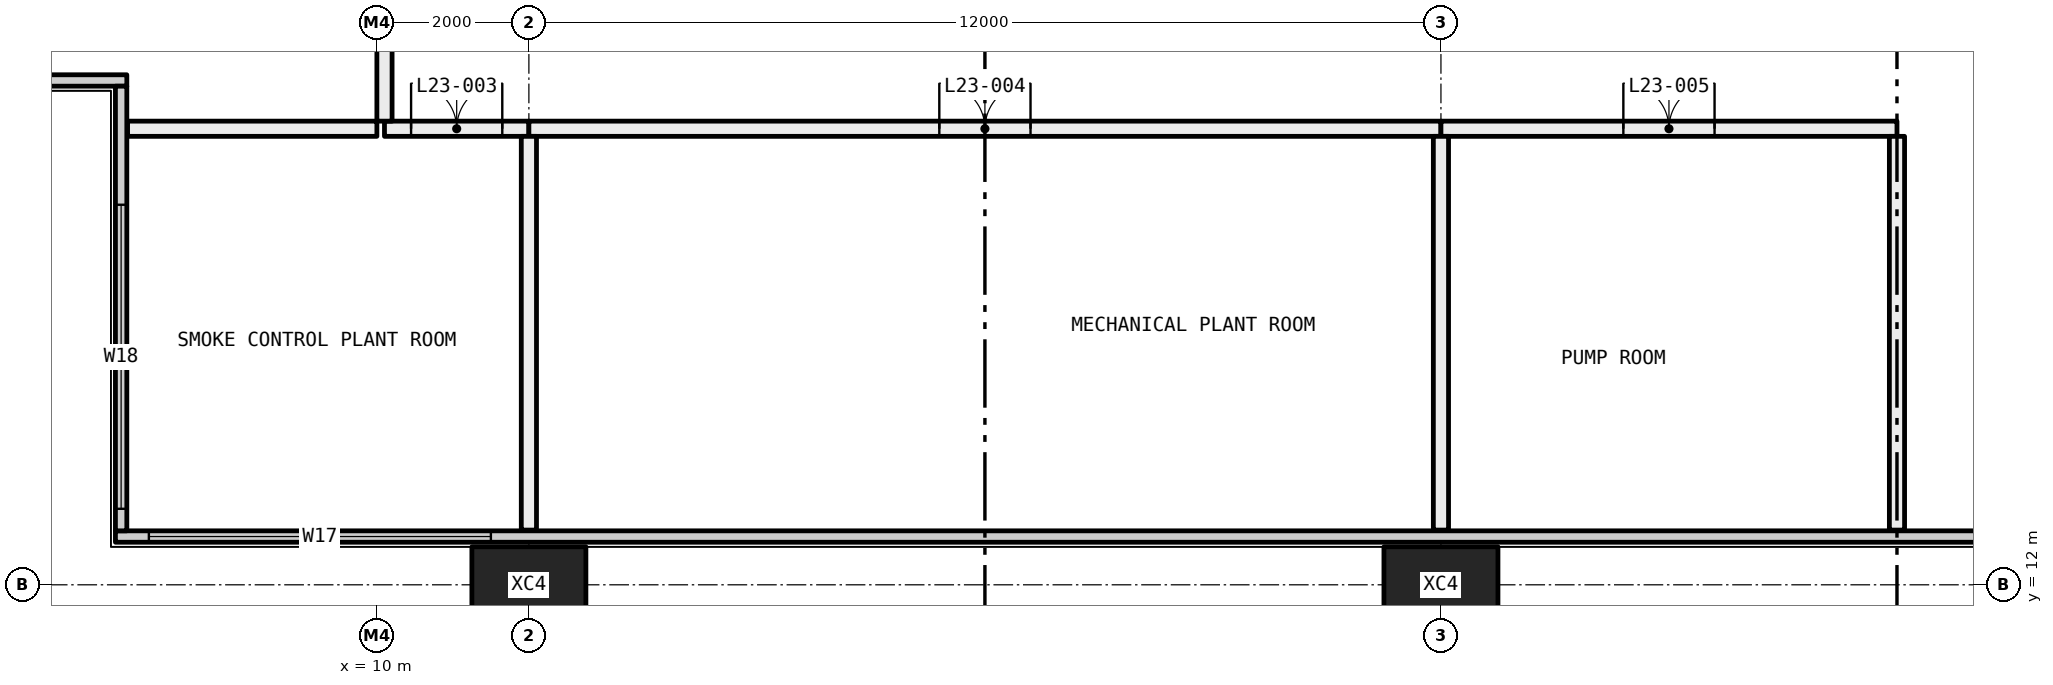
"""IFC4 building model, lengths in metres.
Left out: names, types, materials, properties, quantities, classifications, styles, units other than length and angle.
Written with IfcOpenShell. Run it as: python <this file> out.ifc"""

import sys

from ifc_helpers import new_model, si_unit, direction, frame, frame_2d, origin, origin_2d, place, context, subcontext, project, spatial, rectangle, hollow_rectangle, extrude, element, fill, save


model = new_model("IFC4")
c1 = context("Model", 3, precision=1e-05, world=origin(), true_north=direction((0.0, 1.0)))
c2 = subcontext(c1, "Body", "Model", "MODEL_VIEW")
j1 = project(units=[si_unit("LENGTHUNIT", "METRE"), si_unit("PLANEANGLEUNIT", "RADIAN")], contexts=[c1])
p1 = place(None, origin())
s1 = spatial("IfcSite", under=j1, at=p1, CompositionType="ELEMENT")
p2 = place(p1, origin())
s2 = spatial("IfcBuilding", under=s1, at=p2, CompositionType="ELEMENT")
p3 = place(p2, frame((0.0, 0.0, 92.1)))
s3 = spatial("IfcBuildingStorey", under=s2, at=p3, CompositionType="ELEMENT", Elevation=92.1)
for number, where, z_axis, x_axis in (
    (1, (12.0, 12.0, 0.0), (0.0, 0.0, 1.0), (1.0, 0.0, 0.0)),
    (2, (24.0, 12.0, 0.0), (0.0, 0.0, 1.0), (1.0, 0.0, 0.0)),
):
    element("IfcColumn", number, at=place(p3, frame(where, z_axis=z_axis, x_axis=x_axis)), inside=s3, PredefinedType="COLUMN", context=c2, shape_type="SweptSolid", body=[
        extrude(hollow_rectangle(XDim=1.5, YDim=1.0, WallThickness=0.06, at=origin_2d()), origin(), (0.0, 0.0, 1.0), 4.1),
    ])
p4 = place(p3, frame((6.56, 12.635, 0.0), z_axis=(0.0, 0.0, 1.0), x_axis=(1.0, 0.0, 0.0)))
e3 = element("IfcWall", 3, at=p4, inside=s3, PredefinedType="ELEMENTEDWALL", context=c2, shape_type="SweptSolid", body=[
    extrude(rectangle(XDim=58.88, YDim=0.15, at=frame_2d((29.44, 0.0))), origin(), (0.0, 0.0, 1.0), 4.1),
])
p5 = place(p4, frame((0.44, 0.0, 0.45)))
e4 = element("IfcOpeningElement", 4, at=p5, cuts=e3, PredefinedType="OPENING", context=c2, shape_type="SweptSolid", body=[
    extrude(rectangle(XDim=4.5, YDim=3.6, at=frame_2d((2.25, 1.8))), frame((0.0, 0.085, 0.0), z_axis=(0.0, -1.0, 0.0), x_axis=(1.0, 0.0, 0.0)), (0.0, 0.0, 1.0), 0.17),
])
p6 = place(p4, frame((27.54, 0.0, 0.45)))
e5 = element("IfcOpeningElement", 5, at=p6, cuts=e3, PredefinedType="OPENING", context=c2, shape_type="SweptSolid", body=[
    extrude(rectangle(XDim=1.4, YDim=3.6, at=frame_2d((0.7, 1.8))), frame((0.0, 0.085, 0.0), z_axis=(0.0, -1.0, 0.0), x_axis=(1.0, 0.0, 0.0)), (0.0, 0.0, 1.0), 0.17),
])
p7 = place(p4, frame((25.54, 0.0, 0.0)))
e6 = element("IfcOpeningElement", 6, at=p7, cuts=e3, PredefinedType="OPENING", context=c2, shape_type="SweptSolid", body=[
    extrude(rectangle(XDim=1.8, YDim=2.4, at=frame_2d((0.9, 1.2))), frame((0.0, 0.085, 0.0), z_axis=(0.0, -1.0, 0.0), x_axis=(1.0, 0.0, 0.0)), (0.0, 0.0, 1.0), 0.17),
])
p8 = place(p4, frame((53.94, 0.0, 0.45)))
e7 = element("IfcOpeningElement", 7, at=p8, cuts=e3, PredefinedType="OPENING", context=c2, shape_type="SweptSolid", body=[
    extrude(rectangle(XDim=4.5, YDim=3.6, at=frame_2d((2.25, 1.8))), frame((0.0, 0.085, 0.0), z_axis=(0.0, -1.0, 0.0), x_axis=(1.0, 0.0, 0.0)), (0.0, 0.0, 1.0), 0.17),
])
p9 = place(p3, frame((0.56, 18.635, 0.0), z_axis=(0.0, 0.0, 1.0), x_axis=(1.0, 0.0, 0.0)))
e8 = element("IfcWall", 8, at=p9, inside=s3, PredefinedType="ELEMENTEDWALL", context=c2, shape_type="SweptSolid", body=[
    extrude(rectangle(XDim=6.15, YDim=0.15, at=frame_2d((3.075, 0.0))), origin(), (0.0, 0.0, 1.0), 4.1),
])
p10 = place(p9, frame((0.44, 0.0, 0.45)))
e9 = element("IfcOpeningElement", 9, at=p10, cuts=e8, PredefinedType="OPENING", context=c2, shape_type="SweptSolid", body=[
    extrude(rectangle(XDim=4.0, YDim=3.6, at=frame_2d((2.0, 1.8))), frame((0.0, 0.085, 0.0), z_axis=(0.0, -1.0, 0.0), x_axis=(1.0, 0.0, 0.0)), (0.0, 0.0, 1.0), 0.17),
])
p11 = place(p3, frame((6.635, 12.71, 0.0), z_axis=(0.0, 0.0, 1.0), x_axis=(0.0, 1.0, 0.0)))
e10 = element("IfcWall", 10, at=p11, inside=s3, PredefinedType="ELEMENTEDWALL", context=c2, shape_type="SweptSolid", body=[
    extrude(rectangle(XDim=5.85, YDim=0.15, at=frame_2d((2.925, 0.0))), origin(), (0.0, 0.0, 1.0), 4.1),
])
p12 = place(p11, frame((0.29, 0.0, 0.45)))
e11 = element("IfcOpeningElement", 11, at=p12, cuts=e10, PredefinedType="OPENING", context=c2, shape_type="SweptSolid", body=[
    extrude(rectangle(XDim=4.0, YDim=3.6, at=frame_2d((2.0, 1.8))), frame((0.0, 0.085, 0.0), z_axis=(0.0, -1.0, 0.0), x_axis=(1.0, 0.0, 0.0)), (0.0, 0.0, 1.0), 0.17),
])
p13 = place(p3, frame((10.1, 18.0, 0.0), z_axis=(0.0, 0.0, 1.0), x_axis=(1.0, 0.0, 0.0)))
e12 = element("IfcWall", 12, at=p13, inside=s3, PredefinedType="PARTITIONING", context=c2, shape_type="SweptSolid", body=[
    extrude(rectangle(XDim=1.9, YDim=0.2, at=frame_2d((0.95, 0.0))), origin(), (0.0, 0.0, 1.0), 4.1),
])
p14 = place(p13, frame((0.35, 0.0, 0.0)))
e13 = element("IfcOpeningElement", 13, at=p14, cuts=e12, PredefinedType="OPENING", context=c2, shape_type="SweptSolid", body=[
    extrude(rectangle(XDim=1.2, YDim=2.1, at=frame_2d((0.6, 1.05))), frame((0.0, 0.11, 0.0), z_axis=(0.0, -1.0, 0.0), x_axis=(1.0, 0.0, 0.0)), (0.0, 0.0, 1.0), 0.22),
])
p15 = place(p3, frame((12.0, 18.0, 0.0), z_axis=(0.0, 0.0, 1.0), x_axis=(1.0, 0.0, 0.0)))
e14 = element("IfcWall", 14, at=p15, inside=s3, PredefinedType="PARTITIONING", context=c2, shape_type="SweptSolid", body=[
    extrude(rectangle(XDim=12.0, YDim=0.2, at=frame_2d((6.0, 0.0))), origin(), (0.0, 0.0, 1.0), 4.1),
])
p16 = place(p15, frame((5.4, 0.0, 0.0)))
e15 = element("IfcOpeningElement", 15, at=p16, cuts=e14, PredefinedType="OPENING", context=c2, shape_type="SweptSolid", body=[
    extrude(rectangle(XDim=1.2, YDim=2.1, at=frame_2d((0.6, 1.05))), frame((0.0, 0.11, 0.0), z_axis=(0.0, -1.0, 0.0), x_axis=(1.0, 0.0, 0.0)), (0.0, 0.0, 1.0), 0.22),
])
p17 = place(p3, frame((24.0, 18.0, 0.0), z_axis=(0.0, 0.0, 1.0), x_axis=(1.0, 0.0, 0.0)))
e16 = element("IfcWall", 16, at=p17, inside=s3, PredefinedType="PARTITIONING", context=c2, shape_type="SweptSolid", body=[
    extrude(rectangle(XDim=6.0, YDim=0.2, at=frame_2d((3.0, 0.0))), origin(), (0.0, 0.0, 1.0), 4.1),
])
p18 = place(p17, frame((2.4, 0.0, 0.0)))
e17 = element("IfcOpeningElement", 17, at=p18, cuts=e16, PredefinedType="OPENING", context=c2, shape_type="SweptSolid", body=[
    extrude(rectangle(XDim=1.2, YDim=2.1, at=frame_2d((0.6, 1.05))), frame((0.0, 0.11, 0.0), z_axis=(0.0, -1.0, 0.0), x_axis=(1.0, 0.0, 0.0)), (0.0, 0.0, 1.0), 0.22),
])
p19 = place(p3, frame((30.0, 17.9, 0.0), z_axis=(0.0, 0.0, 1.0), x_axis=(0.0, -1.0, 0.0)))
e18 = element("IfcWall", 18, at=p19, inside=s3, PredefinedType="PARTITIONING", context=c2, shape_type="SweptSolid", body=[
    extrude(rectangle(XDim=5.18, YDim=0.2, at=frame_2d((2.59, 0.0))), origin(), (0.0, 0.0, 1.0), 4.1),
])
p20 = place(p3, frame((10.1, 24.0, 0.0), z_axis=(0.0, 0.0, 1.0), x_axis=(0.0, -1.0, 0.0)))
e19 = element("IfcWall", 19, at=p20, inside=s3, PredefinedType="PARTITIONING", context=c2, shape_type="SweptSolid", body=[
    extrude(rectangle(XDim=5.9, YDim=0.2, at=frame_2d((2.95, 0.0))), origin(), (0.0, 0.0, 1.0), 3.5),
])
p21 = place(p20, frame((2.35, 0.0, 0.0)))
e20 = element("IfcOpeningElement", 20, at=p21, cuts=e19, PredefinedType="OPENING", context=c2, shape_type="SweptSolid", body=[
    extrude(rectangle(XDim=1.2, YDim=2.1, at=frame_2d((0.6, 1.05))), frame((0.0, 0.11, 0.0), z_axis=(0.0, -1.0, 0.0), x_axis=(1.0, 0.0, 0.0)), (0.0, 0.0, 1.0), 0.22),
])
p22 = place(p3, frame((12.0, 12.72, 0.0), z_axis=(0.0, 0.0, 1.0), x_axis=(0.0, 1.0, 0.0)))
e21 = element("IfcWall", 21, at=p22, inside=s3, PredefinedType="PARTITIONING", context=c2, shape_type="SweptSolid", body=[
    extrude(rectangle(XDim=5.18, YDim=0.2, at=frame_2d((2.59, 0.0))), origin(), (0.0, 0.0, 1.0), 4.1),
])
p23 = place(p3, frame((10.0, 18.0, 0.0), z_axis=(0.0, 0.0, 1.0), x_axis=(-1.0, 0.0, 0.0)))
e22 = element("IfcWall", 22, at=p23, inside=s3, PredefinedType="PARTITIONING", context=c2, shape_type="SweptSolid", body=[
    extrude(rectangle(XDim=3.28, YDim=0.2, at=frame_2d((1.64, 0.0))), origin(), (0.0, 0.0, 1.0), 4.1),
])
p24 = place(p3, frame((24.0, 12.72, 0.0), z_axis=(0.0, 0.0, 1.0), x_axis=(0.0, 1.0, 0.0)))
e23 = element("IfcWall", 23, at=p24, inside=s3, PredefinedType="PARTITIONING", context=c2, shape_type="SweptSolid", body=[
    extrude(rectangle(XDim=5.18, YDim=0.2, at=frame_2d((2.59, 0.0))), origin(), (0.0, 0.0, 1.0), 4.1),
])
p25 = place(p5, origin())
e24 = element("IfcWindow", 24, at=p25, inside=s3, PartitioningType="SINGLE_PANEL", PredefinedType="WINDOW", context=c2, shape_type="SweptSolid", body=[
    extrude(rectangle(XDim=4.5, YDim=3.6, at=frame_2d((2.25, 1.8))), frame((0.0, 0.03, 0.0), z_axis=(0.0, -1.0, 0.0), x_axis=(1.0, 0.0, 0.0)), (0.0, 0.0, 1.0), 0.06),
])
fill(e4, e24)
p26 = place(p12, origin())
e25 = element("IfcWindow", 25, at=p26, inside=s3, PartitioningType="SINGLE_PANEL", PredefinedType="WINDOW", context=c2, shape_type="SweptSolid", body=[
    extrude(rectangle(XDim=4.0, YDim=3.6, at=frame_2d((2.0, 1.8))), frame((0.0, 0.03, 0.0), z_axis=(0.0, -1.0, 0.0), x_axis=(1.0, 0.0, 0.0)), (0.0, 0.0, 1.0), 0.06),
])
fill(e11, e25)
p27 = place(p14, origin())
e26 = element("IfcDoor", 26, at=p27, inside=s3, OperationType="DOUBLE_DOOR_SINGLE_SWING", PredefinedType="DOOR", context=c2, shape_type="SweptSolid", body=[
    extrude(rectangle(XDim=1.2, YDim=2.1, at=frame_2d((0.6, 1.05))), frame((0.0, 0.025, 0.0), z_axis=(0.0, -1.0, 0.0), x_axis=(1.0, 0.0, 0.0)), (0.0, 0.0, 1.0), 0.05),
])
fill(e13, e26)
p28 = place(p16, origin())
e27 = element("IfcDoor", 27, at=p28, inside=s3, OperationType="DOUBLE_DOOR_SINGLE_SWING", PredefinedType="DOOR", context=c2, shape_type="SweptSolid", body=[
    extrude(rectangle(XDim=1.2, YDim=2.1, at=frame_2d((0.6, 1.05))), frame((0.0, 0.025, 0.0), z_axis=(0.0, -1.0, 0.0), x_axis=(1.0, 0.0, 0.0)), (0.0, 0.0, 1.0), 0.05),
])
fill(e15, e27)
p29 = place(p18, origin())
e28 = element("IfcDoor", 28, at=p29, inside=s3, OperationType="DOUBLE_DOOR_SINGLE_SWING", PredefinedType="DOOR", context=c2, shape_type="SweptSolid", body=[
    extrude(rectangle(XDim=1.2, YDim=2.1, at=frame_2d((0.6, 1.05))), frame((0.0, 0.025, 0.0), z_axis=(0.0, -1.0, 0.0), x_axis=(1.0, 0.0, 0.0)), (0.0, 0.0, 1.0), 0.05),
])
fill(e17, e28)
save(model, sys.argv[1])
